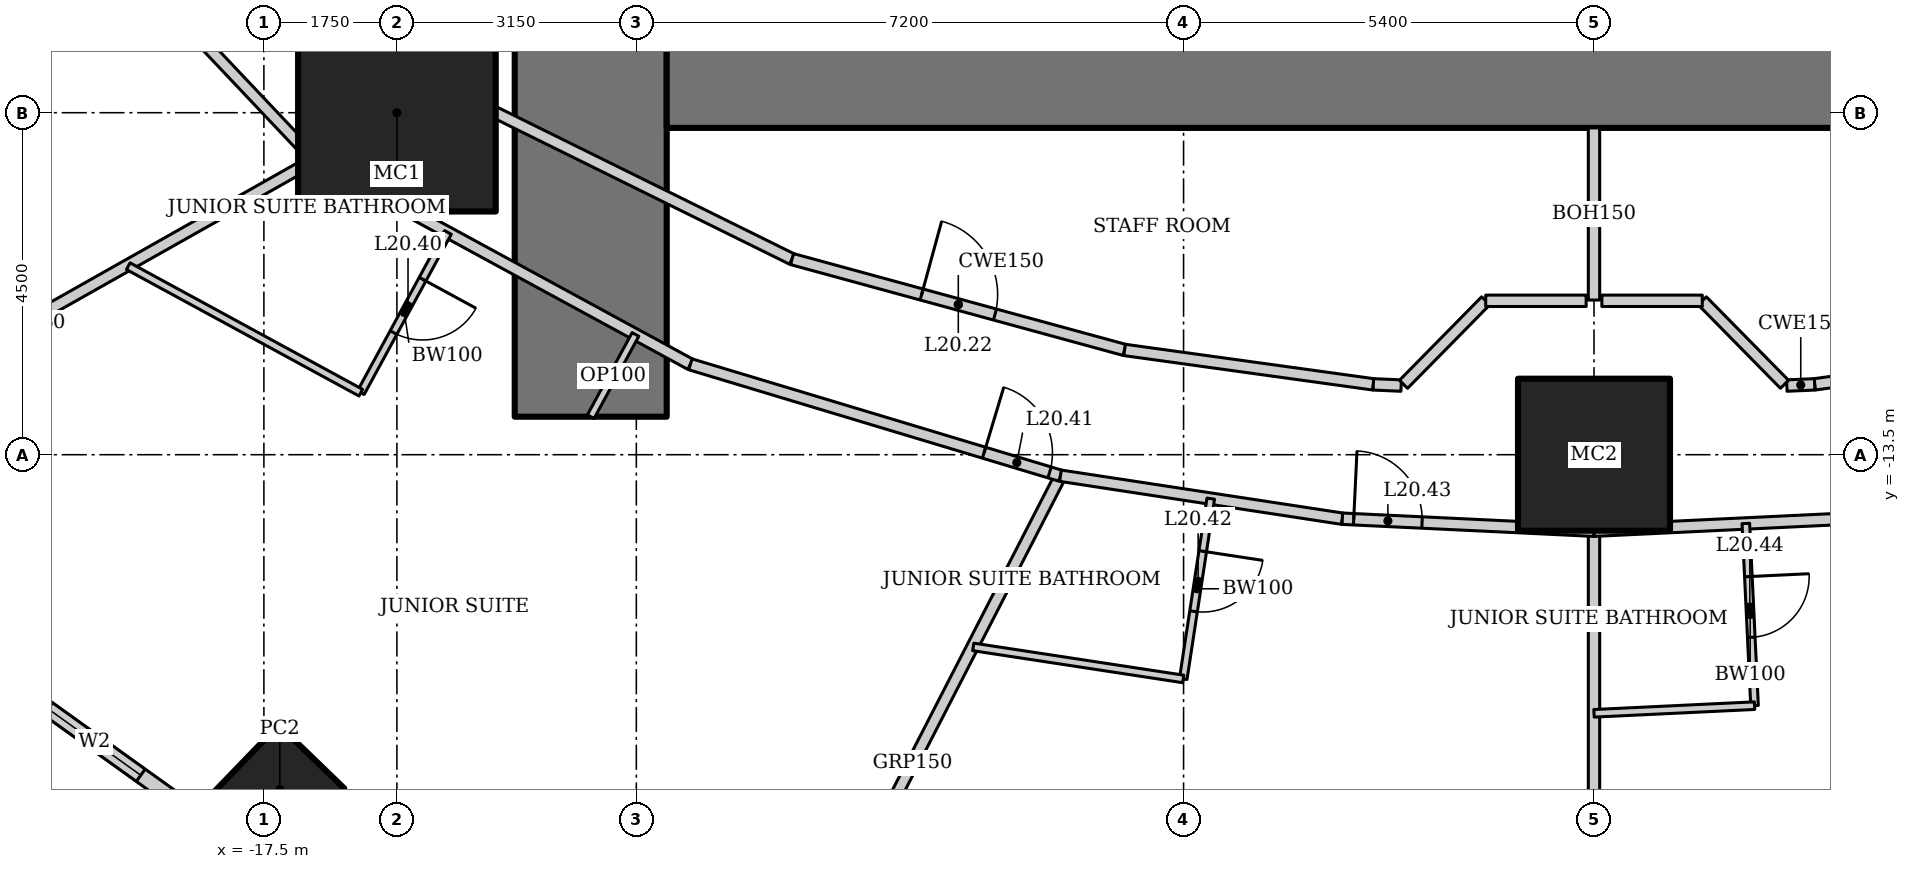
"""IFC4 building model, lengths in metres.
Left out: names, types, materials, properties, quantities, classifications, styles, units other than length and angle.
Written with IfcOpenShell. Run it as: python <this file> out.ifc"""

import sys

from ifc_helpers import new_model, si_unit, direction, frame, frame_2d, origin, origin_2d, place, context, subcontext, project, spatial, rectangle, hollow_rectangle, extrude, element, fill, save


model = new_model("IFC4")
c1 = context("Model", 3, precision=1e-05, world=origin(), true_north=direction((0.0, 1.0)))
c2 = subcontext(c1, "Body", "Model", "MODEL_VIEW")
j1 = project(units=[si_unit("LENGTHUNIT", "METRE"), si_unit("PLANEANGLEUNIT", "RADIAN")], contexts=[c1])
p1 = place(None, origin())
s1 = spatial("IfcSite", under=j1, at=p1, CompositionType="ELEMENT")
p2 = place(p1, origin())
s2 = spatial("IfcBuilding", under=s1, at=p2, CompositionType="ELEMENT")
p3 = place(p2, frame((0.0, 0.0, 87.4)))
s3 = spatial("IfcBuildingStorey", under=s2, at=p3, CompositionType="ELEMENT", Elevation=87.4)
p4 = place(p3, frame((-15.75, -9.0, 0.0), z_axis=(0.0, 0.0, 1.0), x_axis=(1.0, 0.0, 0.0)))
e1 = element("IfcColumn", 1, at=p4, inside=s3, PredefinedType="COLUMN", context=c2, shape_type="SweptSolid", body=[
    extrude(hollow_rectangle(XDim=2.6, YDim=2.6, WallThickness=0.13, at=origin_2d()), origin(), (0.0, 0.0, 1.0), 3.6),
])
p5 = place(p3, frame((0.0, -13.5, 0.0), z_axis=(0.0, 0.0, 1.0), x_axis=(1.0, 0.0, 0.0)))
e2 = element("IfcColumn", 2, at=p5, inside=s3, PredefinedType="COLUMN", context=c2, shape_type="SweptSolid", body=[
    extrude(hollow_rectangle(XDim=2.0, YDim=2.0, WallThickness=0.17, at=origin_2d()), origin(), (0.0, 0.0, 1.0), 3.6),
])
p6 = place(p3, frame((-17.291, -17.905, 0.0), z_axis=(0.0, 0.0, 1.0), x_axis=(0.694658370459, 0.719339800339, 0.0)))
e3 = element("IfcColumn", 3, at=p6, inside=s3, PredefinedType="COLUMN", context=c2, shape_type="SweptSolid", body=[
    extrude(hollow_rectangle(XDim=1.2, YDim=1.2, WallThickness=0.1, at=origin_2d()), origin(), (0.0, 0.0, 1.0), 3.6),
])
p7 = place(p3, frame((-13.2, 13.0, 0.0), z_axis=(0.0, 0.0, 1.0), x_axis=(0.0, -1.0, 0.0)))
e4 = element("IfcWall", 4, at=p7, inside=s3, PredefinedType="SHEAR", context=c2, shape_type="SweptSolid", body=[
    extrude(rectangle(XDim=26.0, YDim=2.0, at=frame_2d((13.0, 0.0))), origin(), (0.0, 0.0, 1.0), 3.6),
])
p8 = place(p7, frame((12.1, 0.0, 0.0)))
e5 = element("IfcOpeningElement", 5, at=p8, cuts=e4, PredefinedType="OPENING", context=c2, shape_type="SweptSolid", body=[
    extrude(rectangle(XDim=1.8, YDim=2.1, at=frame_2d((0.9, 1.05))), frame((0.0, 1.01, 0.0), z_axis=(0.0, -1.0, 0.0), x_axis=(1.0, 0.0, 0.0)), (0.0, 0.0, 1.0), 2.02),
])
p9 = place(p3, frame((-12.2, -8.0, 0.0), z_axis=(0.0, 0.0, 1.0), x_axis=(1.0, 0.0, 0.0)))
e6 = element("IfcWall", 6, at=p9, inside=s3, PredefinedType="SHEAR", context=c2, shape_type="SweptSolid", body=[
    extrude(rectangle(XDim=24.4, YDim=2.4, at=frame_2d((12.2, 0.0))), origin(), (0.0, 0.0, 1.0), 3.6),
])
p10 = place(p3, frame((-24.482, -13.875, 0.0), z_axis=(0.0, 0.0, 1.0), x_axis=(0.812791321576, -0.582554948112, 0.0)))
e7 = element("IfcWall", 7, at=p10, inside=s3, PredefinedType="SOLIDWALL", context=c2, shape_type="SweptSolid", body=[
    extrude(rectangle(XDim=8.063, YDim=0.2, at=frame_2d((4.032, 0.0))), origin(), (0.0, 0.0, 1.0), 3.45),
])
p11 = place(p10, frame((1.466, 0.0, 0.5)))
e8 = element("IfcOpeningElement", 8, at=p11, cuts=e7, PredefinedType="OPENING", context=c2, shape_type="SweptSolid", body=[
    extrude(rectangle(XDim=1.5, YDim=2.2, at=frame_2d((0.75, 1.1))), frame((0.0, 0.11, 0.0), z_axis=(0.0, -1.0, 0.0), x_axis=(1.0, 0.0, 0.0)), (0.0, 0.0, 1.0), 0.22),
])
p12 = place(p10, frame((5.097, 0.0, 0.5)))
e9 = element("IfcOpeningElement", 9, at=p12, cuts=e7, PredefinedType="OPENING", context=c2, shape_type="SweptSolid", body=[
    extrude(rectangle(XDim=1.5, YDim=2.2, at=frame_2d((0.75, 1.1))), frame((0.0, 0.11, 0.0), z_axis=(0.0, -1.0, 0.0), x_axis=(1.0, 0.0, 0.0)), (0.0, 0.0, 1.0), 0.22),
])
p13 = place(p3, frame((-24.435, -13.909, 0.0), z_axis=(0.0, 0.0, 1.0), x_axis=(0.87090601027, 0.491449612143, 0.0)))
e10 = element("IfcWall", 10, at=p13, inside=s3, PredefinedType="PARTITIONING", context=c2, shape_type="SweptSolid", body=[
    extrude(rectangle(XDim=8.726, YDim=0.15, at=frame_2d((4.363, 0.0))), origin(), (0.0, 0.0, 1.0), 2.693),
])
p14 = place(p3, frame((-10.912, -21.346, 0.0), z_axis=(0.0, 0.0, 1.0), x_axis=(0.457327273085, 0.889298468059, 0.0)))
e11 = element("IfcWall", 11, at=p14, inside=s3, PredefinedType="PARTITIONING", context=c2, shape_type="SweptSolid", body=[
    extrude(rectangle(XDim=8.511, YDim=0.15, at=frame_2d((4.256, 0.0))), origin(), (0.0, 0.0, 1.0), 2.528),
])
p15 = place(p3, frame((0.0, -22.825, 0.0), z_axis=(0.0, 0.0, 1.0), x_axis=(0.0, 1.0, 0.0)))
e12 = element("IfcWall", 12, at=p15, inside=s3, PredefinedType="PARTITIONING", context=c2, shape_type="SweptSolid", body=[
    extrude(rectangle(XDim=8.325, YDim=0.15, at=frame_2d((4.162, 0.0))), origin(), (0.0, 0.0, 1.0), 2.924),
])
p16 = place(p3, frame((-20.984, -5.232, 0.0), z_axis=(0.0, 0.0, 1.0), x_axis=(0.687062608696, -0.726598218916, 0.0)))
e13 = element("IfcWall", 13, at=p16, inside=s3, PredefinedType="PARTITIONING", context=c2, shape_type="SweptSolid", body=[
    extrude(rectangle(XDim=6.039, YDim=0.15, at=frame_2d((3.02, 0.0))), origin(), (0.0, 0.0, 1.0), 3.45),
])
p17 = place(p16, frame((0.15, 0.0, 0.0)))
e14 = element("IfcOpeningElement", 14, at=p17, cuts=e13, PredefinedType="OPENING", context=c2, shape_type="SweptSolid", body=[
    extrude(rectangle(XDim=0.9, YDim=2.1, at=frame_2d((0.45, 1.05))), frame((0.0, 0.085, 0.0), z_axis=(0.0, -1.0, 0.0), x_axis=(1.0, 0.0, 0.0)), (0.0, 0.0, 1.0), 0.17),
])
p18 = place(p3, frame((-16.835, -9.62, 0.0), z_axis=(0.0, 0.0, 1.0), x_axis=(0.878450059298, -0.477834169267, 0.0)))
e15 = element("IfcWall", 15, at=p18, inside=s3, PredefinedType="PARTITIONING", context=c2, shape_type="SweptSolid", body=[
    extrude(rectangle(XDim=5.631, YDim=0.15, at=frame_2d((2.815, 0.0))), origin(), (0.0, 0.0, 1.0), 3.45),
])
p19 = place(p3, frame((-11.888, -12.311, 0.0), z_axis=(0.0, 0.0, 1.0), x_axis=(0.957564241242, -0.288219922793, 0.0)))
e16 = element("IfcWall", 16, at=p19, inside=s3, PredefinedType="PARTITIONING", context=c2, shape_type="SweptSolid", body=[
    extrude(rectangle(XDim=5.085, YDim=0.15, at=frame_2d((2.542, 0.0))), origin(), (0.0, 0.0, 1.0), 3.45),
])
p20 = place(p19, frame((4.035, 0.0, 0.0)))
e17 = element("IfcOpeningElement", 17, at=p20, cuts=e16, PredefinedType="OPENING", context=c2, shape_type="SweptSolid", body=[
    extrude(rectangle(XDim=0.9, YDim=2.1, at=frame_2d((0.45, 1.05))), frame((0.0, 0.085, 0.0), z_axis=(0.0, -1.0, 0.0), x_axis=(1.0, 0.0, 0.0)), (0.0, 0.0, 1.0), 0.17),
])
p21 = place(p3, frame((-7.019, -13.776, 0.0), z_axis=(0.0, 0.0, 1.0), x_axis=(0.988564270062, -0.150800145746, 0.0)))
e18 = element("IfcWall", 18, at=p21, inside=s3, PredefinedType="PARTITIONING", context=c2, shape_type="SweptSolid", body=[
    extrude(rectangle(XDim=3.751, YDim=0.15, at=frame_2d((1.875, 0.0))), origin(), (0.0, 0.0, 1.0), 3.45),
])
p22 = place(p3, frame((-3.311, -14.342, 0.0), z_axis=(0.0, 0.0, 1.0), x_axis=(0.998863968075, -0.047652631422, 0.0)))
e19 = element("IfcWall", 19, at=p22, inside=s3, PredefinedType="PARTITIONING", context=c2, shape_type="SweptSolid", body=[
    extrude(rectangle(XDim=3.315, YDim=0.15, at=frame_2d((1.657, 0.0))), origin(), (0.0, 0.0, 1.0), 3.45),
])
p23 = place(p22, frame((0.15, 0.0, 0.0)))
e20 = element("IfcOpeningElement", 20, at=p23, cuts=e19, PredefinedType="OPENING", context=c2, shape_type="SweptSolid", body=[
    extrude(rectangle(XDim=0.9, YDim=2.1, at=frame_2d((0.45, 1.05))), frame((0.0, 0.085, 0.0), z_axis=(0.0, -1.0, 0.0), x_axis=(1.0, 0.0, 0.0)), (0.0, 0.0, 1.0), 0.17),
])
p24 = place(p3, frame((0.0, -14.5, 0.0), z_axis=(0.0, 0.0, 1.0), x_axis=(0.998863968075, 0.047652631422, 0.0)))
e21 = element("IfcWall", 21, at=p24, inside=s3, PredefinedType="PARTITIONING", context=c2, shape_type="SweptSolid", body=[
    extrude(rectangle(XDim=3.315, YDim=0.15, at=frame_2d((1.657, 0.0))), origin(), (0.0, 0.0, 1.0), 3.45),
])
p25 = place(p3, frame((-19.177, -4.781, 0.0), z_axis=(0.0, 0.0, 1.0), x_axis=(0.720837261072, -0.693104352209, 0.0)))
e22 = element("IfcWall", 22, at=p25, inside=s3, PredefinedType="PARTITIONING", context=c2, shape_type="SweptSolid", body=[
    extrude(rectangle(XDim=5.59, YDim=0.15, at=frame_2d((2.795, 0.0))), origin(), (0.0, 0.0, 1.0), 3.45),
])
p26 = place(p25, frame((2.295, 0.0, 0.0)))
e23 = element("IfcOpeningElement", 23, at=p26, cuts=e22, PredefinedType="OPENING", context=c2, shape_type="SweptSolid", body=[
    extrude(rectangle(XDim=1.0, YDim=2.1, at=frame_2d((0.5, 1.05))), frame((0.0, 0.085, 0.0), z_axis=(0.0, -1.0, 0.0), x_axis=(1.0, 0.0, 0.0)), (0.0, 0.0, 1.0), 0.17),
])
p27 = place(p3, frame((-15.147, -8.656, 0.0), z_axis=(0.0, 0.0, 1.0), x_axis=(0.89656943448, -0.442903205177, 0.0)))
e24 = element("IfcWall", 24, at=p27, inside=s3, PredefinedType="PARTITIONING", context=c2, shape_type="SweptSolid", body=[
    extrude(rectangle(XDim=5.126, YDim=0.15, at=frame_2d((2.563, 0.0))), origin(), (0.0, 0.0, 1.0), 3.45),
])
p28 = place(p3, frame((-10.551, -10.926, 0.0), z_axis=(0.0, 0.0, 1.0), x_axis=(0.964644466646, -0.263554648923, 0.0)))
e25 = element("IfcWall", 25, at=p28, inside=s3, PredefinedType="PARTITIONING", context=c2, shape_type="SweptSolid", body=[
    extrude(rectangle(XDim=4.535, YDim=0.15, at=frame_2d((2.268, 0.0))), origin(), (0.0, 0.0, 1.0), 3.45),
])
p29 = place(p28, frame((1.768, 0.0, 0.0)))
e26 = element("IfcOpeningElement", 26, at=p29, cuts=e25, PredefinedType="OPENING", context=c2, shape_type="SweptSolid", body=[
    extrude(rectangle(XDim=1.0, YDim=2.1, at=frame_2d((0.5, 1.05))), frame((0.0, 0.085, 0.0), z_axis=(0.0, -1.0, 0.0), x_axis=(1.0, 0.0, 0.0)), (0.0, 0.0, 1.0), 0.17),
])
for number, where, z_axis, x_axis in (
    (27, (-6.176, -12.122, 0.0), (0.0, 0.0, 1.0), (0.991, -0.137, 0.0)),
    (28, (2.903, -12.574, 0.0), (0.0, 0.0, 1.0), (0.991, 0.137, 0.0)),
):
    element("IfcWall", number, at=place(p3, frame(where, z_axis=z_axis, x_axis=x_axis)), inside=s3, PredefinedType="PARTITIONING", context=c2, shape_type="SweptSolid", body=[
        extrude(rectangle(XDim=3.304, YDim=0.15, at=frame_2d((1.652, 0.0))), origin(), (0.0, 0.0, 1.0), 3.45),
    ])
p30 = place(p3, frame((-15.078, -10.576, 0.0), z_axis=(0.0, 0.0, 1.0), x_axis=(-0.477832549678, -0.878450940274, 0.0)))
e29 = element("IfcWall", 29, at=p30, inside=s3, PredefinedType="PARTITIONING", context=c2, shape_type="SweptSolid", body=[
    extrude(rectangle(XDim=2.4, YDim=0.1, at=frame_2d((1.2, 0.0))), origin(), (0.0, 0.0, 1.0), 3.45),
])
p31 = place(p30, frame((0.7, 0.0, 0.0)))
e30 = element("IfcOpeningElement", 30, at=p31, cuts=e29, PredefinedType="OPENING", context=c2, shape_type="SweptSolid", body=[
    extrude(rectangle(XDim=0.8, YDim=2.1, at=frame_2d((0.4, 1.05))), frame((0.0, 0.06, 0.0), z_axis=(0.0, -1.0, 0.0), x_axis=(1.0, 0.0, 0.0)), (0.0, 0.0, 1.0), 0.12),
])
p32 = place(p3, frame((-16.225, -12.684, 0.0), z_axis=(0.0, 0.0, 1.0), x_axis=(-0.878473578893, 0.477790928322, 0.0)))
e31 = element("IfcWall", 31, at=p32, inside=s3, PredefinedType="PARTITIONING", context=c2, shape_type="SweptSolid", body=[
    extrude(rectangle(XDim=3.483, YDim=0.1, at=frame_2d((1.741, 0.0))), origin(), (0.0, 0.0, 1.0), 3.45),
])
p33 = place(p3, frame((-5.042, -14.078, 0.0), z_axis=(0.0, 0.0, 1.0), x_axis=(-0.150856962013, -0.988555601376, 0.0)))
e32 = element("IfcWall", 32, at=p33, inside=s3, PredefinedType="PARTITIONING", context=c2, shape_type="SweptSolid", body=[
    extrude(rectangle(XDim=2.4, YDim=0.1, at=frame_2d((1.2, 0.0))), origin(), (0.0, 0.0, 1.0), 3.45),
])
p34 = place(p33, frame((0.7, 0.0, 0.0)))
e33 = element("IfcOpeningElement", 33, at=p34, cuts=e32, PredefinedType="OPENING", context=c2, shape_type="SweptSolid", body=[
    extrude(rectangle(XDim=0.8, YDim=2.1, at=frame_2d((0.4, 1.05))), frame((0.0, 0.06, 0.0), z_axis=(0.0, -1.0, 0.0), x_axis=(1.0, 0.0, 0.0)), (0.0, 0.0, 1.0), 0.12),
])
p35 = place(p3, frame((-5.404, -16.45, 0.0), z_axis=(0.0, 0.0, 1.0), x_axis=(-0.988568792086, 0.150770498819, 0.0)))
e34 = element("IfcWall", 34, at=p35, inside=s3, PredefinedType="PARTITIONING", context=c2, shape_type="SweptSolid", body=[
    extrude(rectangle(XDim=2.795, YDim=0.1, at=frame_2d((1.397, 0.0))), origin(), (0.0, 0.0, 1.0), 3.45),
])
p36 = place(p3, frame((1.998, -14.405, 0.0), z_axis=(0.0, 0.0, 1.0), x_axis=(0.047608648396, -0.998866065395, 0.0)))
e35 = element("IfcWall", 35, at=p36, inside=s3, PredefinedType="PARTITIONING", context=c2, shape_type="SweptSolid", body=[
    extrude(rectangle(XDim=2.4, YDim=0.1, at=frame_2d((1.2, 0.0))), origin(), (0.0, 0.0, 1.0), 2.749),
])
p37 = place(p36, frame((0.7, 0.0, 0.0)))
e36 = element("IfcOpeningElement", 36, at=p37, cuts=e35, PredefinedType="OPENING", context=c2, shape_type="SweptSolid", body=[
    extrude(rectangle(XDim=0.8, YDim=2.1, at=frame_2d((0.4, 1.05))), frame((0.0, 0.06, 0.0), z_axis=(0.0, -1.0, 0.0), x_axis=(1.0, 0.0, 0.0)), (0.0, 0.0, 1.0), 0.12),
])
p38 = place(p3, frame((2.112, -16.802, 0.0), z_axis=(0.0, 0.0, 1.0), x_axis=(-0.998862383453, -0.047685835668, 0.0)))
e37 = element("IfcWall", 37, at=p38, inside=s3, PredefinedType="PARTITIONING", context=c2, shape_type="SweptSolid", body=[
    extrude(rectangle(XDim=2.115, YDim=0.1, at=frame_2d((1.057, 0.0))), origin(), (0.0, 0.0, 1.0), 3.45),
])
p39 = place(p3, frame((-13.2, -13.0, 0.0), z_axis=(0.0, 0.0, 1.0), x_axis=(0.477852414256, 0.878440134665, 0.0)))
e38 = element("IfcWall", 38, at=p39, inside=s3, PredefinedType="PARTITIONING", context=c2, shape_type="SweptSolid", body=[
    extrude(rectangle(XDim=1.232, YDim=0.1, at=frame_2d((0.616, 0.0))), origin(), (0.0, 0.0, 1.0), 3.45),
])
for number, where, z_axis, x_axis in (
    (39, (-2.903, -12.574, 0.0), (0.0, 0.0, 1.0), (0.999, -0.043, 0.0)),
    (40, (2.537, -12.59, 0.0), (0.0, 0.0, 1.0), (0.999, 0.043, 0.0)),
):
    element("IfcWall", number, at=place(p3, frame(where, z_axis=z_axis, x_axis=x_axis)), inside=s3, PredefinedType="PARTITIONING", context=c2, shape_type="SweptSolid", body=[
        extrude(rectangle(XDim=0.366, YDim=0.15, at=frame_2d((0.183, 0.0))), origin(), (0.0, 0.0, 1.0), 3.45),
    ])
p40 = place(p3, frame((0.0, -9.2, 0.0), z_axis=(0.0, 0.0, 1.0), x_axis=(0.0, -1.0, 0.0)))
e41 = element("IfcWall", 41, at=p40, inside=s3, PredefinedType="PARTITIONING", context=c2, shape_type="SweptSolid", body=[
    extrude(rectangle(XDim=2.265, YDim=0.15, at=frame_2d((1.133, 0.0))), origin(), (0.0, 0.0, 1.0), 3.044),
])
p41 = place(p3, frame((-2.506, -12.574, 0.0), z_axis=(0.0, 0.0, 1.0), x_axis=(0.701622806479, 0.712548550927, 0.0)))
e42 = element("IfcWall", 42, at=p41, inside=s3, PredefinedType="PARTITIONING", context=c2, shape_type="SweptSolid", body=[
    extrude(rectangle(XDim=1.542, YDim=0.15, at=frame_2d((0.771, 0.0))), origin(), (0.0, 0.0, 1.0), 3.45),
])
p42 = place(p3, frame((-1.425, -11.475, 0.0), z_axis=(0.0, 0.0, 1.0), x_axis=(1.0, 0.0, 0.0)))
e43 = element("IfcWall", 43, at=p42, inside=s3, PredefinedType="PARTITIONING", context=c2, shape_type="SweptSolid", body=[
    extrude(rectangle(XDim=1.321, YDim=0.15, at=frame_2d((0.661, 0.0))), origin(), (0.0, 0.0, 1.0), 3.45),
])
p43 = place(p3, frame((1.425, -11.475, 0.0), z_axis=(0.0, 0.0, 1.0), x_axis=(0.701622806479, -0.712548550927, 0.0)))
e44 = element("IfcWall", 44, at=p43, inside=s3, PredefinedType="PARTITIONING", context=c2, shape_type="SweptSolid", body=[
    extrude(rectangle(XDim=1.542, YDim=0.15, at=frame_2d((0.771, 0.0))), origin(), (0.0, 0.0, 1.0), 3.45),
])
p44 = place(p3, frame((0.103, -11.475, 0.0), z_axis=(0.0, 0.0, 1.0), x_axis=(1.0, 0.0, 0.0)))
e45 = element("IfcWall", 45, at=p44, inside=s3, PredefinedType="PARTITIONING", context=c2, shape_type="SweptSolid", body=[
    extrude(rectangle(XDim=1.321, YDim=0.15, at=frame_2d((0.661, 0.0))), origin(), (0.0, 0.0, 1.0), 3.45),
])
p45 = place(p12, origin())
e46 = element("IfcWindow", 46, at=p45, inside=s3, PartitioningType="SINGLE_PANEL", PredefinedType="WINDOW", context=c2, shape_type="SweptSolid", body=[
    extrude(rectangle(XDim=1.5, YDim=2.2, at=frame_2d((0.75, 1.1))), frame((0.0, 0.03, 0.0), z_axis=(0.0, -1.0, 0.0), x_axis=(1.0, 0.0, 0.0)), (0.0, 0.0, 1.0), 0.06),
])
fill(e9, e46)
p46 = place(p29, origin())
e47 = element("IfcDoor", 47, at=p46, inside=s3, OperationType="SINGLE_SWING_LEFT", PredefinedType="DOOR", context=c2, shape_type="SweptSolid", body=[
    extrude(rectangle(XDim=1.0, YDim=2.1, at=frame_2d((0.5, 1.05))), frame((0.0, 0.025, 0.0), z_axis=(0.0, -1.0, 0.0), x_axis=(1.0, 0.0, 0.0)), (0.0, 0.0, 1.0), 0.05),
])
fill(e26, e47)
p47 = place(p31, origin())
e48 = element("IfcDoor", 48, at=p47, inside=s3, OperationType="SINGLE_SWING_LEFT", PredefinedType="DOOR", context=c2, shape_type="SweptSolid", body=[
    extrude(rectangle(XDim=0.8, YDim=2.1, at=frame_2d((0.4, 1.05))), frame((0.0, 0.025, 0.0), z_axis=(0.0, -1.0, 0.0), x_axis=(1.0, 0.0, 0.0)), (0.0, 0.0, 1.0), 0.05),
])
fill(e30, e48)
p48 = place(p20, origin())
e49 = element("IfcDoor", 49, at=p48, inside=s3, OperationType="SINGLE_SWING_LEFT", PredefinedType="DOOR", context=c2, shape_type="SweptSolid", body=[
    extrude(rectangle(XDim=0.9, YDim=2.1, at=frame_2d((0.45, 1.05))), frame((0.0, 0.025, 0.0), z_axis=(0.0, -1.0, 0.0), x_axis=(1.0, 0.0, 0.0)), (0.0, 0.0, 1.0), 0.05),
])
fill(e17, e49)
p49 = place(p34, origin())
e50 = element("IfcDoor", 50, at=p49, inside=s3, OperationType="SINGLE_SWING_LEFT", PredefinedType="DOOR", context=c2, shape_type="SweptSolid", body=[
    extrude(rectangle(XDim=0.8, YDim=2.1, at=frame_2d((0.4, 1.05))), frame((0.0, 0.025, 0.0), z_axis=(0.0, -1.0, 0.0), x_axis=(1.0, 0.0, 0.0)), (0.0, 0.0, 1.0), 0.05),
])
fill(e33, e50)
p50 = place(p23, origin())
e51 = element("IfcDoor", 51, at=p50, inside=s3, OperationType="SINGLE_SWING_LEFT", PredefinedType="DOOR", context=c2, shape_type="SweptSolid", body=[
    extrude(rectangle(XDim=0.9, YDim=2.1, at=frame_2d((0.45, 1.05))), frame((0.0, 0.025, 0.0), z_axis=(0.0, -1.0, 0.0), x_axis=(1.0, 0.0, 0.0)), (0.0, 0.0, 1.0), 0.05),
])
fill(e20, e51)
p51 = place(p37, origin())
e52 = element("IfcDoor", 52, at=p51, inside=s3, OperationType="SINGLE_SWING_LEFT", PredefinedType="DOOR", context=c2, shape_type="SweptSolid", body=[
    extrude(rectangle(XDim=0.8, YDim=2.1, at=frame_2d((0.4, 1.05))), frame((0.0, 0.025, 0.0), z_axis=(0.0, -1.0, 0.0), x_axis=(1.0, 0.0, 0.0)), (0.0, 0.0, 1.0), 0.05),
])
fill(e36, e52)
save(model, sys.argv[1])
